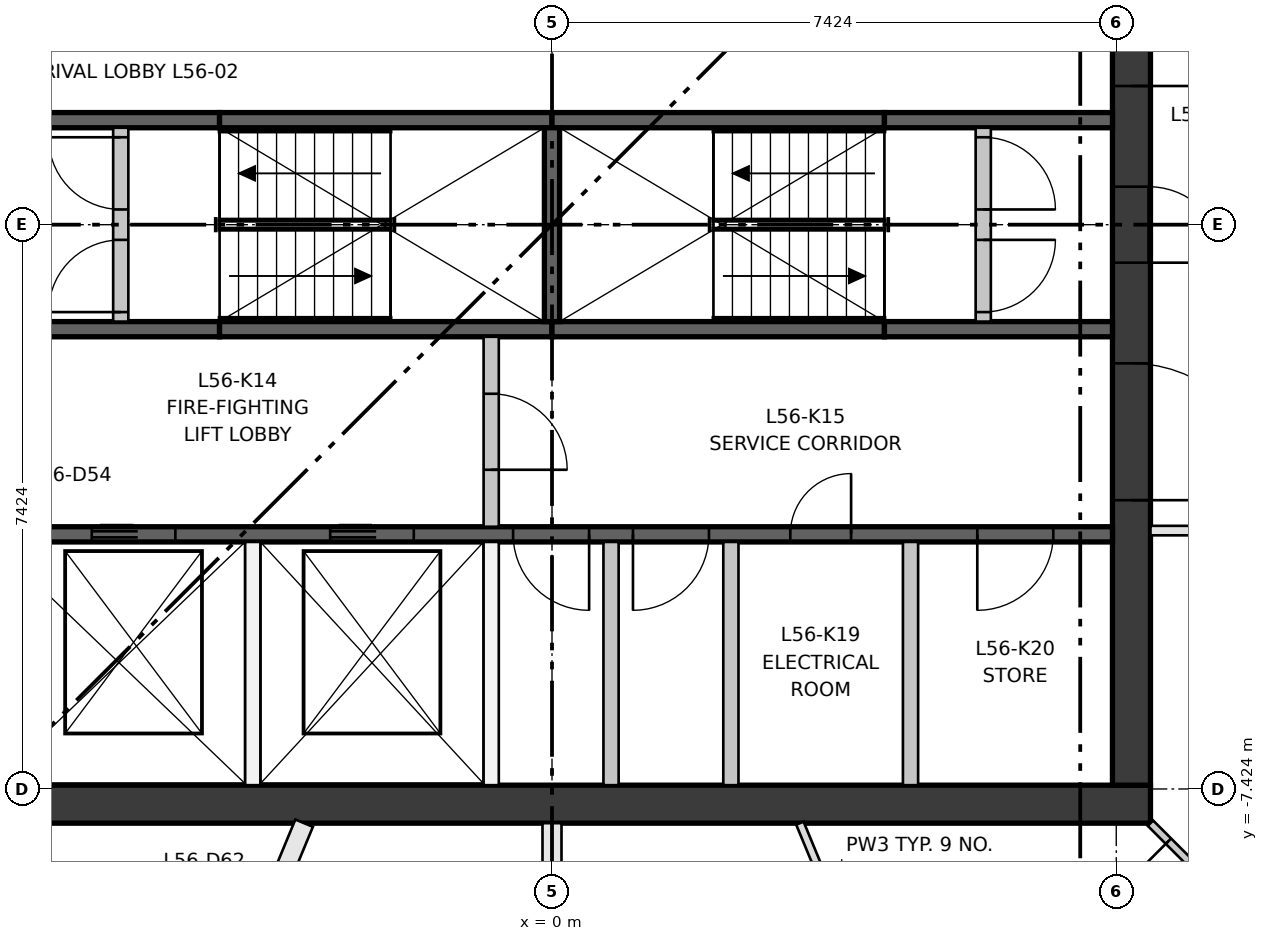
"""IFC4 building model, lengths in metres.
Left out: names, types, materials, properties, quantities, classifications, styles, units other than length and angle.
Written with IfcOpenShell. Run it as: python <this file> out.ifc"""

import sys

from ifc_helpers import new_model, si_unit, direction, frame, frame_2d, origin, place, context, subcontext, project, spatial, rectangle, extrude, element, fill, save


model = new_model("IFC4")
c1 = context("Model", 3, precision=1e-05, world=origin(), true_north=direction((0.0, 1.0)))
c2 = subcontext(c1, "Body", "Model", "MODEL_VIEW")
j1 = project(units=[si_unit("LENGTHUNIT", "METRE"), si_unit("PLANEANGLEUNIT", "RADIAN")], contexts=[c1])
p1 = place(None, origin())
s1 = spatial("IfcSite", under=j1, at=p1, CompositionType="ELEMENT")
p2 = place(p1, origin())
s2 = spatial("IfcBuilding", under=s1, at=p2, CompositionType="ELEMENT")
p3 = place(p2, frame((0.0, 0.0, 207.75)))
s3 = spatial("IfcBuildingStorey", under=s2, at=p3, CompositionType="ELEMENT", Elevation=207.75)
p4 = place(p3, frame((-7.874, -7.624, 0.0), z_axis=(0.0, 0.0, 1.0), x_axis=(1.0, 0.0, 0.0)))
e1 = element("IfcWall", 1, at=p4, inside=s3, PredefinedType="SHEAR", context=c2, shape_type="SweptSolid", body=[
    extrude(rectangle(XDim=15.748, YDim=0.5, at=frame_2d((7.874, 0.0))), origin(), (0.0, 0.0, 1.0), 3.35),
])
p5 = place(p3, frame((7.624, -7.374, 0.0), z_axis=(0.0, 0.0, 1.0), x_axis=(0.0, 1.0, 0.0)))
e2 = element("IfcWall", 2, at=p5, inside=s3, PredefinedType="SHEAR", context=c2, shape_type="SweptSolid", body=[
    extrude(rectangle(XDim=14.748, YDim=0.5, at=frame_2d((7.374, 0.0))), origin(), (0.0, 0.0, 1.0), 3.35),
])
p6 = place(p5, frame((6.874, 0.0, 0.0)))
e3 = element("IfcOpeningElement", 3, at=p6, cuts=e2, PredefinedType="OPENING", context=c2, shape_type="SweptSolid", body=[
    extrude(rectangle(XDim=1.0, YDim=2.1, at=frame_2d((0.5, 1.05))), frame((0.0, 0.26, 0.0), z_axis=(0.0, -1.0, 0.0), x_axis=(1.0, 0.0, 0.0)), (0.0, 0.0, 1.0), 0.52),
])
p7 = place(p5, frame((3.75, 0.0, 0.0)))
e4 = element("IfcOpeningElement", 4, at=p7, cuts=e2, PredefinedType="OPENING", context=c2, shape_type="SweptSolid", body=[
    extrude(rectangle(XDim=1.8, YDim=2.1, at=frame_2d((0.9, 1.05))), frame((0.0, 0.26, 0.0), z_axis=(0.0, -1.0, 0.0), x_axis=(1.0, 0.0, 0.0)), (0.0, 0.0, 1.0), 0.52),
])
p8 = place(p5, frame((9.198, 0.0, 0.0)))
e5 = element("IfcOpeningElement", 5, at=p8, cuts=e2, PredefinedType="OPENING", context=c2, shape_type="SweptSolid", body=[
    extrude(rectangle(XDim=1.8, YDim=2.1, at=frame_2d((0.9, 1.05))), frame((0.0, 0.26, 0.0), z_axis=(0.0, -1.0, 0.0), x_axis=(1.0, 0.0, 0.0)), (0.0, 0.0, 1.0), 0.52),
])
p9 = place(p3, frame((-7.374, -4.074, 0.0), z_axis=(0.0, 0.0, 1.0), x_axis=(1.0, 0.0, 0.0)))
e6 = element("IfcWall", 6, at=p9, inside=s3, PredefinedType="SHEAR", context=c2, shape_type="SweptSolid", body=[
    extrude(rectangle(XDim=14.748, YDim=0.2, at=frame_2d((7.374, 0.0))), origin(), (0.0, 0.0, 1.0), 3.0),
])
p10 = place(p9, frame((1.319, 0.0, 0.0)))
e7 = element("IfcOpeningElement", 7, at=p10, cuts=e6, PredefinedType="OPENING", context=c2, shape_type="SweptSolid", body=[
    extrude(rectangle(XDim=1.1, YDim=2.1, at=frame_2d((0.55, 1.05))), frame((0.0, 0.11, 0.0), z_axis=(0.0, -1.0, 0.0), x_axis=(1.0, 0.0, 0.0)), (0.0, 0.0, 1.0), 0.22),
])
p11 = place(p9, frame((4.456, 0.0, 0.0)))
e8 = element("IfcOpeningElement", 8, at=p11, cuts=e6, PredefinedType="OPENING", context=c2, shape_type="SweptSolid", body=[
    extrude(rectangle(XDim=1.1, YDim=2.1, at=frame_2d((0.55, 1.05))), frame((0.0, 0.11, 0.0), z_axis=(0.0, -1.0, 0.0), x_axis=(1.0, 0.0, 0.0)), (0.0, 0.0, 1.0), 0.22),
])
p12 = place(p9, frame((6.862, 0.0, 0.0)))
e9 = element("IfcOpeningElement", 9, at=p12, cuts=e6, PredefinedType="OPENING", context=c2, shape_type="SweptSolid", body=[
    extrude(rectangle(XDim=1.0, YDim=2.1, at=frame_2d((0.5, 1.05))), frame((0.0, 0.11, 0.0), z_axis=(0.0, -1.0, 0.0), x_axis=(1.0, 0.0, 0.0)), (0.0, 0.0, 1.0), 0.22),
])
p13 = place(p9, frame((8.439, 0.0, 0.0)))
e10 = element("IfcOpeningElement", 10, at=p13, cuts=e6, PredefinedType="OPENING", context=c2, shape_type="SweptSolid", body=[
    extrude(rectangle(XDim=1.0, YDim=2.1, at=frame_2d((0.5, 1.05))), frame((0.0, 0.11, 0.0), z_axis=(0.0, -1.0, 0.0), x_axis=(1.0, 0.0, 0.0)), (0.0, 0.0, 1.0), 0.22),
])
p14 = place(p9, frame((10.509, 0.0, 0.0)))
e11 = element("IfcOpeningElement", 11, at=p14, cuts=e6, PredefinedType="OPENING", context=c2, shape_type="SweptSolid", body=[
    extrude(rectangle(XDim=0.8, YDim=2.1, at=frame_2d((0.4, 1.05))), frame((0.0, 0.11, 0.0), z_axis=(0.0, -1.0, 0.0), x_axis=(1.0, 0.0, 0.0)), (0.0, 0.0, 1.0), 0.22),
])
p15 = place(p9, frame((12.969, 0.0, 0.0)))
e12 = element("IfcOpeningElement", 12, at=p15, cuts=e6, PredefinedType="OPENING", context=c2, shape_type="SweptSolid", body=[
    extrude(rectangle(XDim=1.0, YDim=2.1, at=frame_2d((0.5, 1.05))), frame((0.0, 0.11, 0.0), z_axis=(0.0, -1.0, 0.0), x_axis=(1.0, 0.0, 0.0)), (0.0, 0.0, 1.0), 0.22),
])
p16 = place(p3, frame((-7.374, -1.375, 0.0), z_axis=(0.0, 0.0, 1.0), x_axis=(1.0, 0.0, 0.0)))
e13 = element("IfcWall", 13, at=p16, inside=s3, PredefinedType="SHEAR", context=c2, shape_type="SweptSolid", body=[
    extrude(rectangle(XDim=3.0, YDim=0.2, at=frame_2d((1.5, 0.0))), origin(), (0.0, 0.0, 1.0), 3.0),
])
for number, where, z_axis, x_axis in (
    (14, (-4.374, -1.375, 0.0), (0.0, 0.0, 1.0), (1.0, 0.0, 0.0)),
    (15, (0.0, -1.375, 0.0), (0.0, 0.0, 1.0), (1.0, 0.0, 0.0)),
):
    element("IfcWall", number, at=place(p3, frame(where, z_axis=z_axis, x_axis=x_axis)), inside=s3, PredefinedType="SHEAR", context=c2, shape_type="SweptSolid", body=[
        extrude(rectangle(XDim=4.374, YDim=0.2, at=frame_2d((2.187, 0.0))), origin(), (0.0, 0.0, 1.0), 3.0),
    ])
for number, where, z_axis, x_axis in (
    (16, (4.374, -1.375, 0.0), (0.0, 0.0, 1.0), (1.0, 0.0, 0.0)),
    (17, (-7.374, 1.375, 0.0), (0.0, 0.0, 1.0), (1.0, 0.0, 0.0)),
):
    element("IfcWall", number, at=place(p3, frame(where, z_axis=z_axis, x_axis=x_axis)), inside=s3, PredefinedType="SHEAR", context=c2, shape_type="SweptSolid", body=[
        extrude(rectangle(XDim=3.0, YDim=0.2, at=frame_2d((1.5, 0.0))), origin(), (0.0, 0.0, 1.0), 3.0),
    ])
for number, where, z_axis, x_axis in (
    (18, (-4.374, 1.375, 0.0), (0.0, 0.0, 1.0), (1.0, 0.0, 0.0)),
    (19, (0.0, 1.375, 0.0), (0.0, 0.0, 1.0), (1.0, 0.0, 0.0)),
):
    element("IfcWall", number, at=place(p3, frame(where, z_axis=z_axis, x_axis=x_axis)), inside=s3, PredefinedType="SHEAR", context=c2, shape_type="SweptSolid", body=[
        extrude(rectangle(XDim=4.374, YDim=0.2, at=frame_2d((2.187, 0.0))), origin(), (0.0, 0.0, 1.0), 3.0),
    ])
p17 = place(p3, frame((4.374, 1.375, 0.0), z_axis=(0.0, 0.0, 1.0), x_axis=(1.0, 0.0, 0.0)))
e20 = element("IfcWall", 20, at=p17, inside=s3, PredefinedType="SHEAR", context=c2, shape_type="SweptSolid", body=[
    extrude(rectangle(XDim=3.0, YDim=0.2, at=frame_2d((1.5, 0.0))), origin(), (0.0, 0.0, 1.0), 3.0),
])
p18 = place(p3, frame((0.0, -1.275, 0.0), z_axis=(0.0, 0.0, 1.0), x_axis=(0.0, 1.0, 0.0)))
e21 = element("IfcWall", 21, at=p18, inside=s3, PredefinedType="SHEAR", context=c2, shape_type="SweptSolid", body=[
    extrude(rectangle(XDim=2.55, YDim=0.2, at=frame_2d((1.275, 0.0))), origin(), (0.0, 0.0, 1.0), 3.0),
])
for number, where, z_axis, x_axis in (
    (22, (-3.937, -7.374, 0.0), (0.0, 0.0, 1.0), (0.0, 1.0, 0.0)),
    (23, (-0.8, -7.374, 0.0), (0.0, 0.0, 1.0), (0.0, 1.0, 0.0)),
):
    element("IfcWall", number, at=place(p3, frame(where, z_axis=z_axis, x_axis=x_axis)), inside=s3, PredefinedType="PARTITIONING", context=c2, shape_type="SweptSolid", body=[
        extrude(rectangle(XDim=3.2, YDim=0.2, at=frame_2d((1.6, 0.0))), origin(), (0.0, 0.0, 1.0), 3.0),
    ])
p19 = place(p3, frame((-0.8, -3.974, 0.0), z_axis=(0.0, 0.0, 1.0), x_axis=(0.0, 1.0, 0.0)))
e24 = element("IfcWall", 24, at=p19, inside=s3, PredefinedType="PARTITIONING", context=c2, shape_type="SweptSolid", body=[
    extrude(rectangle(XDim=2.499, YDim=0.2, at=frame_2d((1.25, 0.0))), origin(), (0.0, 0.0, 1.0), 3.0),
])
p20 = place(p19, frame((0.75, 0.0, 0.0)))
e25 = element("IfcOpeningElement", 25, at=p20, cuts=e24, PredefinedType="OPENING", context=c2, shape_type="SweptSolid", body=[
    extrude(rectangle(XDim=1.0, YDim=2.1, at=frame_2d((0.5, 1.05))), frame((0.0, 0.11, 0.0), z_axis=(0.0, -1.0, 0.0), x_axis=(1.0, 0.0, 0.0)), (0.0, 0.0, 1.0), 0.22),
])
for number, where, z_axis, x_axis in (
    (26, (0.777, -7.374, 0.0), (0.0, 0.0, 1.0), (0.0, 1.0, 0.0)),
    (27, (2.354, -7.374, 0.0), (0.0, 0.0, 1.0), (0.0, 1.0, 0.0)),
    (28, (4.717, -7.374, 0.0), (0.0, 0.0, 1.0), (0.0, 1.0, 0.0)),
):
    element("IfcWall", number, at=place(p3, frame(where, z_axis=z_axis, x_axis=x_axis)), inside=s3, PredefinedType="PARTITIONING", context=c2, shape_type="SweptSolid", body=[
        extrude(rectangle(XDim=3.2, YDim=0.2, at=frame_2d((1.6, 0.0))), origin(), (0.0, 0.0, 1.0), 3.0),
    ])
p21 = place(p3, frame((-5.674, -1.275, 0.0), z_axis=(0.0, 0.0, 1.0), x_axis=(0.0, 1.0, 0.0)))
e29 = element("IfcWall", 29, at=p21, inside=s3, PredefinedType="PARTITIONING", context=c2, shape_type="SweptSolid", body=[
    extrude(rectangle(XDim=2.55, YDim=0.2, at=frame_2d((1.275, 0.0))), origin(), (0.0, 0.0, 1.0), 3.0),
])
p22 = place(p21, frame((0.125, 0.0, 0.0)))
e30 = element("IfcOpeningElement", 30, at=p22, cuts=e29, PredefinedType="OPENING", context=c2, shape_type="SweptSolid", body=[
    extrude(rectangle(XDim=0.95, YDim=2.1, at=frame_2d((0.475, 1.05))), frame((0.0, 0.11, 0.0), z_axis=(0.0, -1.0, 0.0), x_axis=(1.0, 0.0, 0.0)), (0.0, 0.0, 1.0), 0.22),
])
p23 = place(p21, frame((1.475, 0.0, 0.0)))
e31 = element("IfcOpeningElement", 31, at=p23, cuts=e29, PredefinedType="OPENING", context=c2, shape_type="SweptSolid", body=[
    extrude(rectangle(XDim=0.95, YDim=2.1, at=frame_2d((0.475, 1.05))), frame((0.0, 0.11, 0.0), z_axis=(0.0, -1.0, 0.0), x_axis=(1.0, 0.0, 0.0)), (0.0, 0.0, 1.0), 0.22),
])
p24 = place(p3, frame((5.674, -1.275, 0.0), z_axis=(0.0, 0.0, 1.0), x_axis=(0.0, 1.0, 0.0)))
e32 = element("IfcWall", 32, at=p24, inside=s3, PredefinedType="PARTITIONING", context=c2, shape_type="SweptSolid", body=[
    extrude(rectangle(XDim=2.55, YDim=0.2, at=frame_2d((1.275, 0.0))), origin(), (0.0, 0.0, 1.0), 3.0),
])
p25 = place(p24, frame((0.125, 0.0, 0.0)))
e33 = element("IfcOpeningElement", 33, at=p25, cuts=e32, PredefinedType="OPENING", context=c2, shape_type="SweptSolid", body=[
    extrude(rectangle(XDim=0.95, YDim=2.1, at=frame_2d((0.475, 1.05))), frame((0.0, 0.11, 0.0), z_axis=(0.0, -1.0, 0.0), x_axis=(1.0, 0.0, 0.0)), (0.0, 0.0, 1.0), 0.22),
])
p26 = place(p24, frame((1.475, 0.0, 0.0)))
e34 = element("IfcOpeningElement", 34, at=p26, cuts=e32, PredefinedType="OPENING", context=c2, shape_type="SweptSolid", body=[
    extrude(rectangle(XDim=0.95, YDim=2.1, at=frame_2d((0.475, 1.05))), frame((0.0, 0.11, 0.0), z_axis=(0.0, -1.0, 0.0), x_axis=(1.0, 0.0, 0.0)), (0.0, 0.0, 1.0), 0.22),
])
p27 = place(p3, frame((10.349, -4.024, 0.0), z_axis=(0.0, 0.0, 1.0), x_axis=(-1.0, 0.0, 0.0)))
e35 = element("IfcWall", 35, at=p27, inside=s3, PredefinedType="PARTITIONING", context=c2, shape_type="SweptSolid", body=[
    extrude(rectangle(XDim=2.475, YDim=0.125, at=frame_2d((1.238, 0.0))), origin(), (0.0, 0.0, 1.0), 3.0),
])
p28 = place(p27, frame((0.7, 0.0, 0.0)))
e36 = element("IfcOpeningElement", 36, at=p28, cuts=e35, PredefinedType="OPENING", context=c2, shape_type="SweptSolid", body=[
    extrude(rectangle(XDim=1.0, YDim=2.1, at=frame_2d((0.5, 1.05))), frame((0.0, 0.073, 0.0), z_axis=(0.0, -1.0, 0.0), x_axis=(1.0, 0.0, 0.0)), (0.0, 0.0, 1.0), 0.145),
])
p29 = place(p3, frame((-3.261, -7.874, 0.0), z_axis=(0.0, 0.0, 1.0), x_axis=(-0.382686527355, -0.923878250519, 0.0)))
e37 = element("IfcWall", 37, at=p29, inside=s3, PredefinedType="PARTITIONING", context=c2, shape_type="SweptSolid", body=[
    extrude(rectangle(XDim=2.877, YDim=0.25, at=frame_2d((1.438, 0.0))), origin(), (0.0, 0.0, 1.0), 3.0),
])
p30 = place(p29, frame((0.9, 0.0, 0.0)))
e38 = element("IfcOpeningElement", 38, at=p30, cuts=e37, PredefinedType="OPENING", context=c2, shape_type="SweptSolid", body=[
    extrude(rectangle(XDim=1.0, YDim=2.1, at=frame_2d((0.5, 1.05))), frame((0.0, 0.135, 0.0), z_axis=(0.0, -1.0, 0.0), x_axis=(1.0, 0.0, 0.0)), (0.0, 0.0, 1.0), 0.27),
])
p31 = place(p3, frame((0.0, -7.874, 0.0), z_axis=(0.0, 0.0, 1.0), x_axis=(0.0, -1.0, 0.0)))
e39 = element("IfcWall", 39, at=p31, inside=s3, PredefinedType="PARTITIONING", context=c2, shape_type="SweptSolid", body=[
    extrude(rectangle(XDim=3.526, YDim=0.25, at=frame_2d((1.763, 0.0))), origin(), (0.0, 0.0, 1.0), 3.0),
])
p32 = place(p3, frame((3.261, -7.874, 0.0), z_axis=(0.0, 0.0, 1.0), x_axis=(0.382686527355, -0.923878250519, 0.0)))
e40 = element("IfcWall", 40, at=p32, inside=s3, PredefinedType="PARTITIONING", context=c2, shape_type="SweptSolid", body=[
    extrude(rectangle(XDim=2.877, YDim=0.105, at=frame_2d((1.438, 0.0))), origin(), (0.0, 0.0, 1.0), 3.0),
])
p33 = place(p3, frame((10.939, -10.939, 0.0), z_axis=(0.0, 0.0, 1.0), x_axis=(-0.707106781187, 0.707106781187, 0.0)))
e41 = element("IfcWall", 41, at=p33, inside=s3, PredefinedType="PARTITIONING", context=c2, shape_type="SweptSolid", body=[
    extrude(rectangle(XDim=4.334, YDim=0.1, at=frame_2d((2.167, 0.0))), origin(), (0.0, 0.0, 1.0), 3.0),
])
p34 = place(p33, frame((3.0, 0.0, 0.0)))
e42 = element("IfcOpeningElement", 42, at=p34, cuts=e41, PredefinedType="OPENING", context=c2, shape_type="SweptSolid", body=[
    extrude(rectangle(XDim=1.0, YDim=2.1, at=frame_2d((0.5, 1.05))), frame((0.0, 0.06, 0.0), z_axis=(0.0, -1.0, 0.0), x_axis=(1.0, 0.0, 0.0)), (0.0, 0.0, 1.0), 0.12),
])
p35 = place(p10, origin())
e43 = element("IfcDoor", 43, at=p35, inside=s3, OperationType="DOUBLE_DOOR_SLIDING", PredefinedType="DOOR", context=c2, shape_type="SweptSolid", body=[
    extrude(rectangle(XDim=1.1, YDim=2.1, at=frame_2d((0.55, 1.05))), frame((0.0, 0.025, 0.0), z_axis=(0.0, -1.0, 0.0), x_axis=(1.0, 0.0, 0.0)), (0.0, 0.0, 1.0), 0.05),
])
fill(e7, e43)
p36 = place(p11, origin())
e44 = element("IfcDoor", 44, at=p36, inside=s3, OperationType="DOUBLE_DOOR_SLIDING", PredefinedType="DOOR", context=c2, shape_type="SweptSolid", body=[
    extrude(rectangle(XDim=1.1, YDim=2.1, at=frame_2d((0.55, 1.05))), frame((0.0, 0.025, 0.0), z_axis=(0.0, -1.0, 0.0), x_axis=(1.0, 0.0, 0.0)), (0.0, 0.0, 1.0), 0.05),
])
fill(e8, e44)
p37 = place(p22, origin())
e45 = element("IfcDoor", 45, at=p37, inside=s3, OperationType="SINGLE_SWING_LEFT", PredefinedType="DOOR", context=c2, shape_type="SweptSolid", body=[
    extrude(rectangle(XDim=0.95, YDim=2.1, at=frame_2d((0.475, 1.05))), frame((0.0, 0.025, 0.0), z_axis=(0.0, -1.0, 0.0), x_axis=(1.0, 0.0, 0.0)), (0.0, 0.0, 1.0), 0.05),
])
fill(e30, e45)
p38 = place(p23, origin())
e46 = element("IfcDoor", 46, at=p38, inside=s3, OperationType="SINGLE_SWING_RIGHT", PredefinedType="DOOR", context=c2, shape_type="SweptSolid", body=[
    extrude(rectangle(XDim=0.95, YDim=2.1, at=frame_2d((0.475, 1.05))), frame((0.0, 0.025, 0.0), z_axis=(0.0, -1.0, 0.0), x_axis=(1.0, 0.0, 0.0)), (0.0, 0.0, 1.0), 0.05),
])
fill(e31, e46)
p39 = place(p25, frame((0.95, 0.0, 0.0), z_axis=(0.0, 0.0, 1.0), x_axis=(-1.0, 0.0, 0.0)))
e47 = element("IfcDoor", 47, at=p39, inside=s3, OperationType="SINGLE_SWING_RIGHT", PredefinedType="DOOR", context=c2, shape_type="SweptSolid", body=[
    extrude(rectangle(XDim=0.95, YDim=2.1, at=frame_2d((0.475, 1.05))), frame((0.0, 0.025, 0.0), z_axis=(0.0, -1.0, 0.0), x_axis=(1.0, 0.0, 0.0)), (0.0, 0.0, 1.0), 0.05),
])
fill(e33, e47)
p40 = place(p26, frame((0.95, 0.0, 0.0), z_axis=(0.0, 0.0, 1.0), x_axis=(-1.0, 0.0, 0.0)))
e48 = element("IfcDoor", 48, at=p40, inside=s3, OperationType="SINGLE_SWING_LEFT", PredefinedType="DOOR", context=c2, shape_type="SweptSolid", body=[
    extrude(rectangle(XDim=0.95, YDim=2.1, at=frame_2d((0.475, 1.05))), frame((0.0, 0.025, 0.0), z_axis=(0.0, -1.0, 0.0), x_axis=(1.0, 0.0, 0.0)), (0.0, 0.0, 1.0), 0.05),
])
fill(e34, e48)
p41 = place(p20, frame((1.0, 0.0, 0.0), z_axis=(0.0, 0.0, 1.0), x_axis=(-1.0, 0.0, 0.0)))
e49 = element("IfcDoor", 49, at=p41, inside=s3, OperationType="SINGLE_SWING_LEFT", PredefinedType="DOOR", context=c2, shape_type="SweptSolid", body=[
    extrude(rectangle(XDim=1.0, YDim=2.1, at=frame_2d((0.5, 1.05))), frame((0.0, 0.025, 0.0), z_axis=(0.0, -1.0, 0.0), x_axis=(1.0, 0.0, 0.0)), (0.0, 0.0, 1.0), 0.05),
])
fill(e25, e49)
p42 = place(p12, frame((1.0, 0.0, 0.0), z_axis=(0.0, 0.0, 1.0), x_axis=(-1.0, 0.0, 0.0)))
e50 = element("IfcDoor", 50, at=p42, inside=s3, OperationType="SINGLE_SWING_RIGHT", PredefinedType="DOOR", context=c2, shape_type="SweptSolid", body=[
    extrude(rectangle(XDim=1.0, YDim=2.1, at=frame_2d((0.5, 1.05))), frame((0.0, 0.025, 0.0), z_axis=(0.0, -1.0, 0.0), x_axis=(1.0, 0.0, 0.0)), (0.0, 0.0, 1.0), 0.05),
])
fill(e9, e50)
p43 = place(p13, frame((1.0, 0.0, 0.0), z_axis=(0.0, 0.0, 1.0), x_axis=(-1.0, 0.0, 0.0)))
e51 = element("IfcDoor", 51, at=p43, inside=s3, OperationType="SINGLE_SWING_LEFT", PredefinedType="DOOR", context=c2, shape_type="SweptSolid", body=[
    extrude(rectangle(XDim=1.0, YDim=2.1, at=frame_2d((0.5, 1.05))), frame((0.0, 0.025, 0.0), z_axis=(0.0, -1.0, 0.0), x_axis=(1.0, 0.0, 0.0)), (0.0, 0.0, 1.0), 0.05),
])
fill(e10, e51)
p44 = place(p14, origin())
e52 = element("IfcDoor", 52, at=p44, inside=s3, OperationType="SINGLE_SWING_RIGHT", PredefinedType="DOOR", context=c2, shape_type="SweptSolid", body=[
    extrude(rectangle(XDim=0.8, YDim=2.1, at=frame_2d((0.4, 1.05))), frame((0.0, 0.025, 0.0), z_axis=(0.0, -1.0, 0.0), x_axis=(1.0, 0.0, 0.0)), (0.0, 0.0, 1.0), 0.05),
])
fill(e11, e52)
p45 = place(p15, frame((1.0, 0.0, 0.0), z_axis=(0.0, 0.0, 1.0), x_axis=(-1.0, 0.0, 0.0)))
e53 = element("IfcDoor", 53, at=p45, inside=s3, OperationType="SINGLE_SWING_LEFT", PredefinedType="DOOR", context=c2, shape_type="SweptSolid", body=[
    extrude(rectangle(XDim=1.0, YDim=2.1, at=frame_2d((0.5, 1.05))), frame((0.0, 0.025, 0.0), z_axis=(0.0, -1.0, 0.0), x_axis=(1.0, 0.0, 0.0)), (0.0, 0.0, 1.0), 0.05),
])
fill(e12, e53)
p46 = place(p6, frame((1.0, 0.0, 0.0), z_axis=(0.0, 0.0, 1.0), x_axis=(-1.0, 0.0, 0.0)))
e54 = element("IfcDoor", 54, at=p46, inside=s3, OperationType="SINGLE_SWING_LEFT", PredefinedType="DOOR", context=c2, shape_type="SweptSolid", body=[
    extrude(rectangle(XDim=1.0, YDim=2.1, at=frame_2d((0.5, 1.05))), frame((0.0, 0.25, 0.0), z_axis=(0.0, -1.0, 0.0), x_axis=(1.0, 0.0, 0.0)), (0.0, 0.0, 1.0), 0.05),
])
fill(e3, e54)
p47 = place(p7, frame((1.8, 0.0, 0.0), z_axis=(0.0, 0.0, 1.0), x_axis=(-1.0, 0.0, 0.0)))
e55 = element("IfcDoor", 55, at=p47, inside=s3, OperationType="DOUBLE_DOOR_SINGLE_SWING", PredefinedType="DOOR", context=c2, shape_type="SweptSolid", body=[
    extrude(rectangle(XDim=1.8, YDim=2.1, at=frame_2d((0.9, 1.05))), frame((0.0, 0.025, 0.0), z_axis=(0.0, -1.0, 0.0), x_axis=(1.0, 0.0, 0.0)), (0.0, 0.0, 1.0), 0.05),
])
fill(e4, e55)
p48 = place(p8, frame((1.8, 0.0, 0.0), z_axis=(0.0, 0.0, 1.0), x_axis=(-1.0, 0.0, 0.0)))
e56 = element("IfcDoor", 56, at=p48, inside=s3, OperationType="DOUBLE_DOOR_SINGLE_SWING", PredefinedType="DOOR", context=c2, shape_type="SweptSolid", body=[
    extrude(rectangle(XDim=1.8, YDim=2.1, at=frame_2d((0.9, 1.05))), frame((0.0, 0.025, 0.0), z_axis=(0.0, -1.0, 0.0), x_axis=(1.0, 0.0, 0.0)), (0.0, 0.0, 1.0), 0.05),
])
fill(e5, e56)
p49 = place(p34, origin())
e57 = element("IfcDoor", 57, at=p49, inside=s3, OperationType="SINGLE_SWING_RIGHT", PredefinedType="DOOR", context=c2, shape_type="SweptSolid", body=[
    extrude(rectangle(XDim=1.0, YDim=2.1, at=frame_2d((0.5, 1.05))), frame((0.0, 0.025, 0.0), z_axis=(0.0, -1.0, 0.0), x_axis=(1.0, 0.0, 0.0)), (0.0, 0.0, 1.0), 0.05),
])
fill(e42, e57)
save(model, sys.argv[1])
